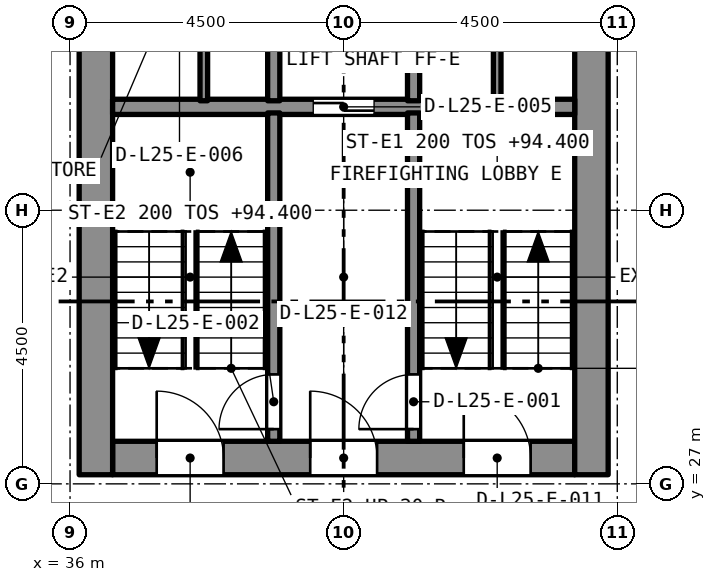
"""IFC4 building model, lengths in metres.
Left out: names, types, materials, properties, quantities, classifications, styles, units other than length and angle.
Written with IfcOpenShell. Run it as: python <this file> out.ifc"""

import sys

from ifc_helpers import new_model, si_unit, direction, frame, frame_2d, origin, place, context, subcontext, project, spatial, rectangle, extrude, element, fill, save


model = new_model("IFC4")
c1 = context("Model", 3, precision=1e-05, world=origin(), true_north=direction((0.0, 1.0)))
c2 = subcontext(c1, "Body", "Model", "MODEL_VIEW")
j1 = project(units=[si_unit("LENGTHUNIT", "METRE"), si_unit("PLANEANGLEUNIT", "RADIAN")], contexts=[c1])
p1 = place(None, origin())
s1 = spatial("IfcSite", under=j1, at=p1, CompositionType="ELEMENT")
p2 = place(p1, origin())
s2 = spatial("IfcBuilding", under=s1, at=p2, CompositionType="ELEMENT")
p3 = place(p2, frame((0.0, 0.0, 92.8)))
s3 = spatial("IfcBuildingStorey", under=s2, at=p3, CompositionType="ELEMENT", Elevation=92.8)
p4 = place(p3, frame((36.7, 27.425, 0.0), z_axis=(0.0, 0.0, 1.0), x_axis=(1.0, 0.0, 0.0)))
e1 = element("IfcWall", 1, at=p4, inside=s3, PredefinedType="SOLIDWALL", context=c2, shape_type="SweptSolid", body=[
    extrude(rectangle(XDim=7.6, YDim=0.55, at=frame_2d((3.8, 0.0))), origin(), (0.0, 0.0, 1.0), 3.2),
])
p5 = place(p4, frame((5.775, 0.0, 0.0)))
e2 = element("IfcOpeningElement", 2, at=p5, cuts=e1, PredefinedType="OPENING", context=c2, shape_type="SweptSolid", body=[
    extrude(rectangle(XDim=1.1, YDim=2.1, at=frame_2d((0.55, 1.05))), frame((0.0, 0.285, 0.0), z_axis=(0.0, -1.0, 0.0), x_axis=(1.0, 0.0, 0.0)), (0.0, 0.0, 1.0), 0.57),
])
p6 = place(p4, frame((3.25, 0.0, 0.0)))
e3 = element("IfcOpeningElement", 3, at=p6, cuts=e1, PredefinedType="OPENING", context=c2, shape_type="SweptSolid", body=[
    extrude(rectangle(XDim=1.1, YDim=2.1, at=frame_2d((0.55, 1.05))), frame((0.0, 0.285, 0.0), z_axis=(0.0, -1.0, 0.0), x_axis=(1.0, 0.0, 0.0)), (0.0, 0.0, 1.0), 0.57),
])
p7 = place(p4, frame((0.725, 0.0, 0.0)))
e4 = element("IfcOpeningElement", 4, at=p7, cuts=e1, PredefinedType="OPENING", context=c2, shape_type="SweptSolid", body=[
    extrude(rectangle(XDim=1.1, YDim=2.1, at=frame_2d((0.55, 1.05))), frame((0.0, 0.285, 0.0), z_axis=(0.0, -1.0, 0.0), x_axis=(1.0, 0.0, 0.0)), (0.0, 0.0, 1.0), 0.57),
])
p8 = place(p3, frame((36.425, 27.15, 0.0), z_axis=(0.0, 0.0, 1.0), x_axis=(0.0, 1.0, 0.0)))
e5 = element("IfcWall", 5, at=p8, inside=s3, PredefinedType="SOLIDWALL", context=c2, shape_type="SweptSolid", body=[
    extrude(rectangle(XDim=13.2, YDim=0.55, at=frame_2d((6.6, 0.0))), origin(), (0.0, 0.0, 1.0), 3.2),
])
p9 = place(p8, frame((8.8, 0.0, 0.0)))
e6 = element("IfcOpeningElement", 6, at=p9, cuts=e5, PredefinedType="OPENING", context=c2, shape_type="SweptSolid", body=[
    extrude(rectangle(XDim=1.2, YDim=2.1, at=frame_2d((0.6, 1.05))), frame((0.0, 0.285, 0.0), z_axis=(0.0, -1.0, 0.0), x_axis=(1.0, 0.0, 0.0)), (0.0, 0.0, 1.0), 0.57),
])
p10 = place(p3, frame((44.575, 27.15, 0.0), z_axis=(0.0, 0.0, 1.0), x_axis=(0.0, 1.0, 0.0)))
e7 = element("IfcWall", 7, at=p10, inside=s3, PredefinedType="SOLIDWALL", context=c2, shape_type="SweptSolid", body=[
    extrude(rectangle(XDim=13.2, YDim=0.55, at=frame_2d((6.6, 0.0))), origin(), (0.0, 0.0, 1.0), 3.2),
])
p11 = place(p10, frame((8.8, 0.0, 0.0)))
e8 = element("IfcOpeningElement", 8, at=p11, cuts=e7, PredefinedType="OPENING", context=c2, shape_type="SweptSolid", body=[
    extrude(rectangle(XDim=1.2, YDim=2.1, at=frame_2d((0.6, 1.05))), frame((0.0, 0.285, 0.0), z_axis=(0.0, -1.0, 0.0), x_axis=(1.0, 0.0, 0.0)), (0.0, 0.0, 1.0), 0.57),
])
p12 = place(p3, frame((36.7, 33.2, 0.0), z_axis=(0.0, 0.0, 1.0), x_axis=(1.0, 0.0, 0.0)))
e9 = element("IfcWall", 9, at=p12, inside=s3, PredefinedType="SOLIDWALL", context=c2, shape_type="SweptSolid", body=[
    extrude(rectangle(XDim=7.6, YDim=0.25, at=frame_2d((3.8, 0.0))), origin(), (0.0, 0.0, 1.0), 2.9),
])
p13 = place(p12, frame((3.3, 0.0, 0.0)))
e10 = element("IfcOpeningElement", 10, at=p13, cuts=e9, PredefinedType="OPENING", context=c2, shape_type="SweptSolid", body=[
    extrude(rectangle(XDim=1.0, YDim=2.1, at=frame_2d((0.5, 1.05))), frame((0.0, 0.135, 0.0), z_axis=(0.0, -1.0, 0.0), x_axis=(1.0, 0.0, 0.0)), (0.0, 0.0, 1.0), 0.27),
])
p14 = place(p3, frame((41.65, 27.7, 0.0), z_axis=(0.0, 0.0, 1.0), x_axis=(0.0, 1.0, 0.0)))
e11 = element("IfcWall", 11, at=p14, inside=s3, PredefinedType="SOLIDWALL", context=c2, shape_type="SweptSolid", body=[
    extrude(rectangle(XDim=5.4, YDim=0.2, at=frame_2d((2.7, 0.0))), origin(), (0.0, 0.0, 1.0), 2.9),
])
p15 = place(p14, frame((0.2, 0.0, 0.0)))
e12 = element("IfcOpeningElement", 12, at=p15, cuts=e11, PredefinedType="OPENING", context=c2, shape_type="SweptSolid", body=[
    extrude(rectangle(XDim=0.9, YDim=2.1, at=frame_2d((0.45, 1.05))), frame((0.0, 0.11, 0.0), z_axis=(0.0, -1.0, 0.0), x_axis=(1.0, 0.0, 0.0)), (0.0, 0.0, 1.0), 0.22),
])
p16 = place(p3, frame((39.35, 27.7, 0.0), z_axis=(0.0, 0.0, 1.0), x_axis=(0.0, 1.0, 0.0)))
e13 = element("IfcWall", 13, at=p16, inside=s3, PredefinedType="SOLIDWALL", context=c2, shape_type="SweptSolid", body=[
    extrude(rectangle(XDim=5.4, YDim=0.2, at=frame_2d((2.7, 0.0))), origin(), (0.0, 0.0, 1.0), 2.9),
])
p17 = place(p16, frame((0.2, 0.0, 0.0)))
e14 = element("IfcOpeningElement", 14, at=p17, cuts=e13, PredefinedType="OPENING", context=c2, shape_type="SweptSolid", body=[
    extrude(rectangle(XDim=0.9, YDim=2.1, at=frame_2d((0.45, 1.05))), frame((0.0, 0.11, 0.0), z_axis=(0.0, -1.0, 0.0), x_axis=(1.0, 0.0, 0.0)), (0.0, 0.0, 1.0), 0.22),
])
for number, where, z_axis, x_axis in (
    (15, (41.65, 33.3, 0.0), (0.0, 0.0, 1.0), (0.0, 1.0, 0.0)),
    (16, (39.35, 33.3, 0.0), (0.0, 0.0, 1.0), (0.0, 1.0, 0.0)),
):
    element("IfcWall", number, at=place(p3, frame(where, z_axis=z_axis, x_axis=x_axis)), inside=s3, PredefinedType="SOLIDWALL", context=c2, shape_type="SweptSolid", body=[
        extrude(rectangle(XDim=2.3, YDim=0.2, at=frame_2d((1.15, 0.0))), origin(), (0.0, 0.0, 1.0), 2.9),
    ])
for number, where, z_axis, x_axis in (
    (17, (43.025, 33.3, 0.0), (0.0, 0.0, 1.0), (0.0, 1.0, 0.0)),
    (18, (38.2, 33.3, 0.0), (0.0, 0.0, 1.0), (0.0, 1.0, 0.0)),
):
    element("IfcWall", number, at=place(p3, frame(where, z_axis=z_axis, x_axis=x_axis)), inside=s3, PredefinedType="PARTITIONING", context=c2, shape_type="SweptSolid", body=[
        extrude(rectangle(XDim=2.3, YDim=0.125, at=frame_2d((1.15, 0.0))), origin(), (0.0, 0.0, 1.0), 2.9),
    ])
p18 = place(p15, origin())
e19 = element("IfcDoor", 19, at=p18, inside=s3, OperationType="SINGLE_SWING_LEFT", PredefinedType="DOOR", context=c2, shape_type="SweptSolid", body=[
    extrude(rectangle(XDim=0.9, YDim=2.1, at=frame_2d((0.45, 1.05))), frame((0.0, 0.025, 0.0), z_axis=(0.0, -1.0, 0.0), x_axis=(1.0, 0.0, 0.0)), (0.0, 0.0, 1.0), 0.05),
])
fill(e12, e19)
p19 = place(p17, origin())
e20 = element("IfcDoor", 20, at=p19, inside=s3, OperationType="SINGLE_SWING_LEFT", PredefinedType="DOOR", context=c2, shape_type="SweptSolid", body=[
    extrude(rectangle(XDim=0.9, YDim=2.1, at=frame_2d((0.45, 1.05))), frame((0.0, 0.025, 0.0), z_axis=(0.0, -1.0, 0.0), x_axis=(1.0, 0.0, 0.0)), (0.0, 0.0, 1.0), 0.05),
])
fill(e14, e20)
p20 = place(p13, origin())
e21 = element("IfcDoor", 21, at=p20, inside=s3, OperationType="SLIDING_TO_LEFT", PredefinedType="DOOR", context=c2, shape_type="SweptSolid", body=[
    extrude(rectangle(XDim=1.0, YDim=2.1, at=frame_2d((0.5, 1.05))), frame((0.0, 0.025, 0.0), z_axis=(0.0, -1.0, 0.0), x_axis=(1.0, 0.0, 0.0)), (0.0, 0.0, 1.0), 0.05),
])
fill(e10, e21)
p21 = place(p5, origin())
e22 = element("IfcDoor", 22, at=p21, inside=s3, OperationType="SINGLE_SWING_LEFT", PredefinedType="DOOR", context=c2, shape_type="SweptSolid", body=[
    extrude(rectangle(XDim=1.1, YDim=2.1, at=frame_2d((0.55, 1.05))), frame((0.0, 0.025, 0.0), z_axis=(0.0, -1.0, 0.0), x_axis=(1.0, 0.0, 0.0)), (0.0, 0.0, 1.0), 0.05),
])
fill(e2, e22)
p22 = place(p6, origin())
e23 = element("IfcDoor", 23, at=p22, inside=s3, OperationType="SINGLE_SWING_LEFT", PredefinedType="DOOR", context=c2, shape_type="SweptSolid", body=[
    extrude(rectangle(XDim=1.1, YDim=2.1, at=frame_2d((0.55, 1.05))), frame((0.0, 0.025, 0.0), z_axis=(0.0, -1.0, 0.0), x_axis=(1.0, 0.0, 0.0)), (0.0, 0.0, 1.0), 0.05),
])
fill(e3, e23)
p23 = place(p7, origin())
e24 = element("IfcDoor", 24, at=p23, inside=s3, OperationType="SINGLE_SWING_LEFT", PredefinedType="DOOR", context=c2, shape_type="SweptSolid", body=[
    extrude(rectangle(XDim=1.1, YDim=2.1, at=frame_2d((0.55, 1.05))), frame((0.0, 0.025, 0.0), z_axis=(0.0, -1.0, 0.0), x_axis=(1.0, 0.0, 0.0)), (0.0, 0.0, 1.0), 0.05),
])
fill(e4, e24)
save(model, sys.argv[1])
